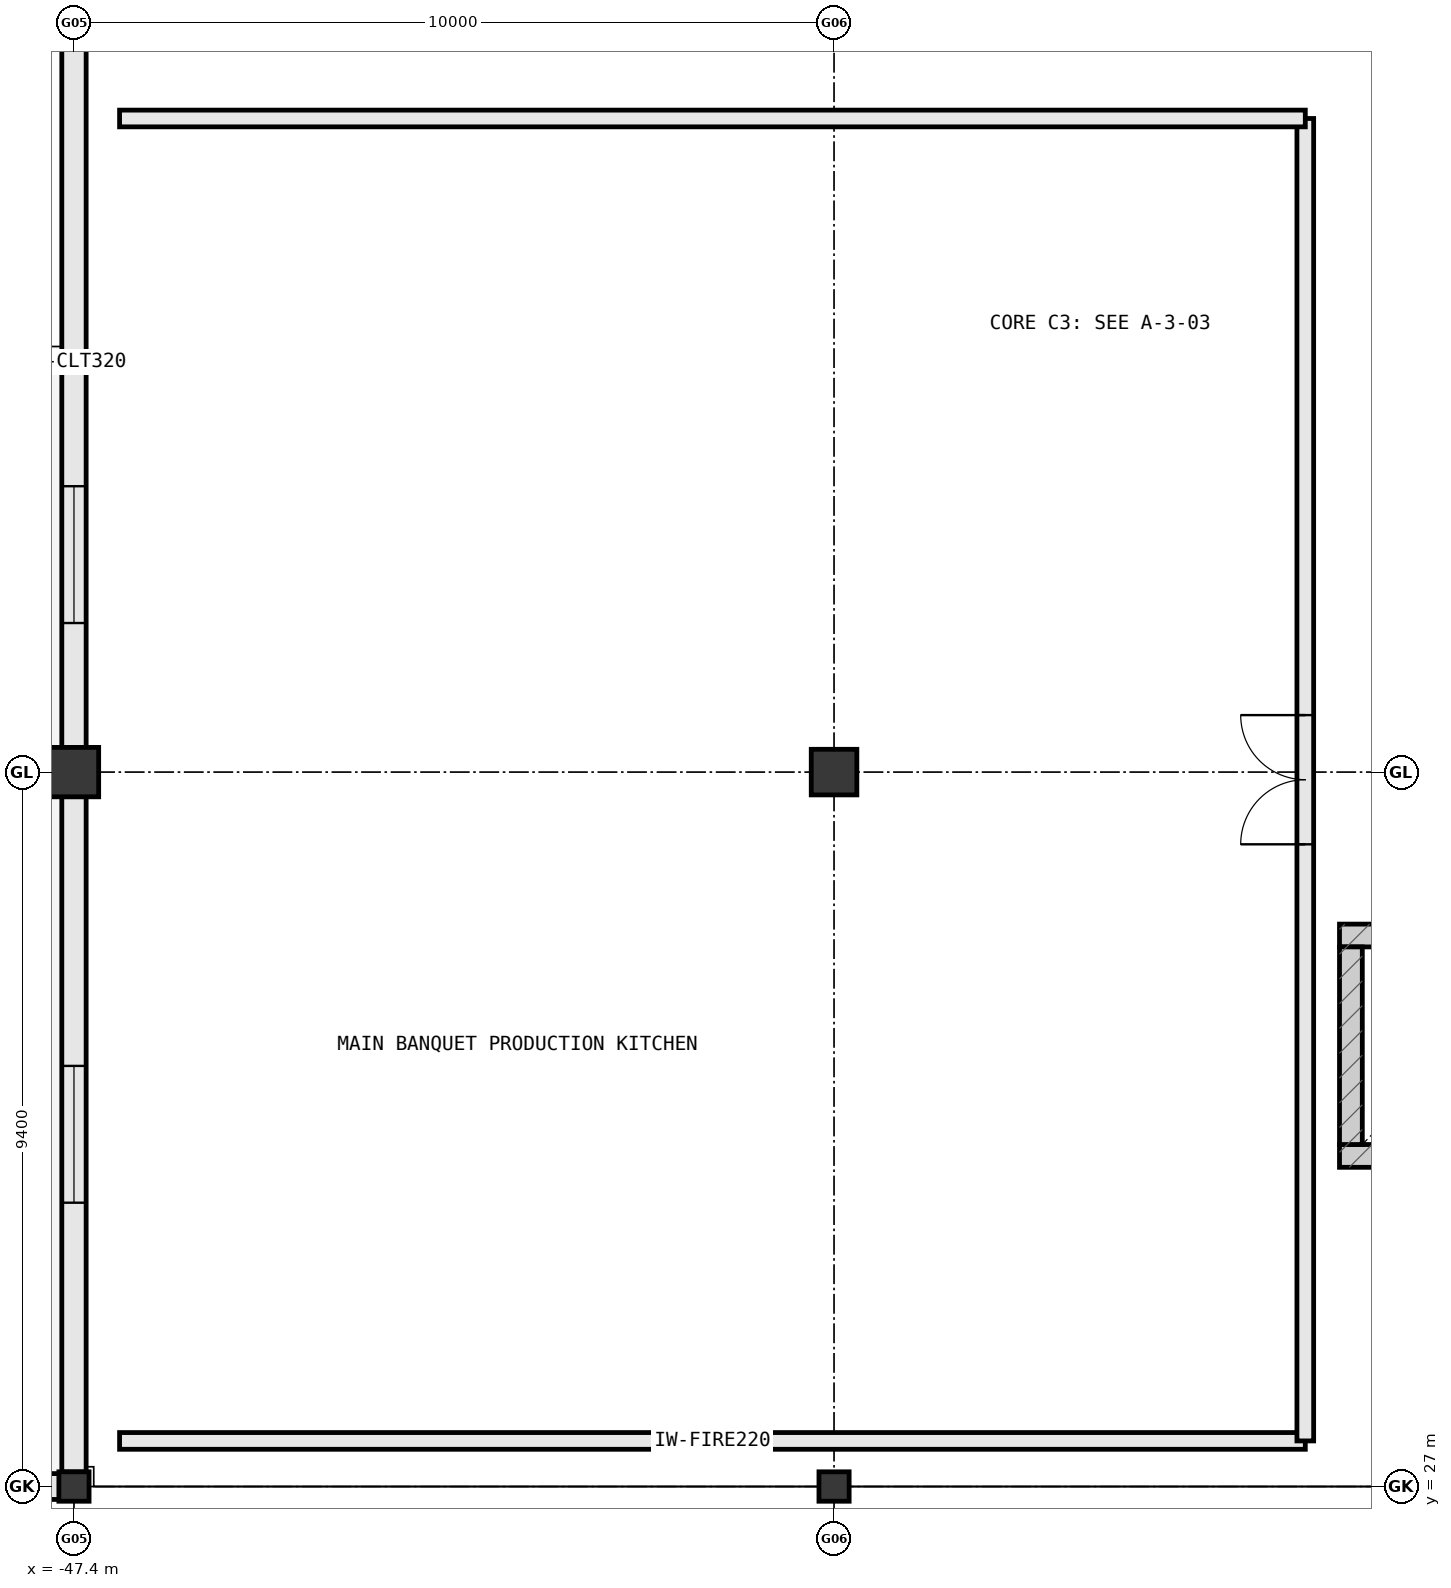
"""IFC4 building model, lengths in metres.
Left out: names, types, materials, properties, quantities, classifications, styles, units other than length and angle.
Written with IfcOpenShell. Run it as: python <this file> out.ifc"""

import sys

from ifc_helpers import new_model, si_unit, direction, frame, frame_2d, origin, origin_2d, place, context, subcontext, project, spatial, rectangle, i_section, extrude, element, fill, save


model = new_model("IFC4")
c1 = context("Model", 3, precision=1e-05, world=origin(), true_north=direction((0.0, 1.0)))
c2 = subcontext(c1, "Body", "Model", "MODEL_VIEW")
j1 = project(units=[si_unit("LENGTHUNIT", "METRE"), si_unit("PLANEANGLEUNIT", "RADIAN")], contexts=[c1])
p1 = place(None, origin())
s1 = spatial("IfcSite", under=j1, at=p1, CompositionType="ELEMENT")
p2 = place(p1, origin())
s2 = spatial("IfcBuilding", under=s1, at=p2, CompositionType="ELEMENT")
p3 = place(p2, origin())
s3 = spatial("IfcBuildingStorey", under=s2, at=p3, CompositionType="ELEMENT", Elevation=0.0)
for number, where, z_axis, x_axis in (
    (1, (-47.4, 27.0, 0.0), (0.0, 0.0, 1.0), (1.0, 0.0, 0.0)),
    (2, (-37.4, 27.0, 0.0), (0.0, 0.0, 1.0), (1.0, 0.0, 0.0)),
):
    element("IfcColumn", number, at=place(p3, frame(where, z_axis=z_axis, x_axis=x_axis)), inside=s3, PredefinedType="COLUMN", context=c2, shape_type="SweptSolid", body=[
        extrude(i_section(OverallWidth=0.397, OverallDepth=0.387, WebThickness=0.021, FlangeThickness=0.033, at=origin_2d()), origin(), (0.0, 0.0, 1.0), 5.4),
    ])
p4 = place(p3, frame((-47.4, 36.4, 0.0), z_axis=(0.0, 0.0, 1.0), x_axis=(1.0, 0.0, 0.0)))
e3 = element("IfcColumn", 3, at=p4, inside=s3, PredefinedType="COLUMN", context=c2, shape_type="SweptSolid", body=[
    extrude(rectangle(XDim=0.65, YDim=0.65, at=origin_2d()), origin(), (0.0, 0.0, 1.0), 5.4),
])
p5 = place(p3, frame((-37.4, 36.4, 0.0), z_axis=(0.0, 0.0, 1.0), x_axis=(1.0, 0.0, 0.0)))
e4 = element("IfcColumn", 4, at=p5, inside=s3, PredefinedType="COLUMN", context=c2, shape_type="SweptSolid", body=[
    extrude(rectangle(XDim=0.6, YDim=0.6, at=origin_2d()), origin(), (0.0, 0.0, 1.0), 5.4),
])
p6 = place(p3, frame((-47.408, 27.0, 0.0), z_axis=(0.0, 0.0, 1.0), x_axis=(-1.0, 0.0, 0.0)))
e5 = element("IfcWall", 5, at=p6, inside=s3, PredefinedType="STANDARD", context=c2, shape_type="SweptSolid", body=[
    extrude(rectangle(XDim=9.983, YDim=0.34, at=frame_2d((4.991, 0.0))), origin(), (0.0, 0.0, 1.0), 4.414),
])
p7 = place(p6, frame((1.071, 0.0, 0.85)))
e6 = element("IfcOpeningElement", 6, at=p7, cuts=e5, PredefinedType="OPENING", context=c2, shape_type="SweptSolid", body=[
    extrude(rectangle(XDim=2.85, YDim=2.18, at=frame_2d((1.425, 1.09))), frame((0.0, 0.182, 0.0), z_axis=(0.0, -1.0, 0.0), x_axis=(1.0, 0.0, 0.0)), (0.0, 0.0, 1.0), 0.364),
])
p8 = place(p6, frame((6.062, 0.0, 0.85)))
e7 = element("IfcOpeningElement", 7, at=p8, cuts=e5, PredefinedType="OPENING", context=c2, shape_type="SweptSolid", body=[
    extrude(rectangle(XDim=2.85, YDim=2.18, at=frame_2d((1.425, 1.09))), frame((0.0, 0.182, 0.0), z_axis=(0.0, -1.0, 0.0), x_axis=(1.0, 0.0, 0.0)), (0.0, 0.0, 1.0), 0.364),
])
p9 = place(p3, frame((-47.4, 46.877, 0.0), z_axis=(0.0, 0.0, 1.0), x_axis=(0.0, -1.0, 0.0)))
e8 = element("IfcWall", 8, at=p9, inside=s3, PredefinedType="STANDARD", context=c2, shape_type="SweptSolid", body=[
    extrude(rectangle(XDim=10.154, YDim=0.32, at=frame_2d((5.077, 0.0))), origin(), (0.0, 0.0, 1.0), 4.422),
])
p10 = place(p9, frame((6.716, 0.0, 0.85)))
e9 = element("IfcOpeningElement", 9, at=p10, cuts=e8, PredefinedType="OPENING", context=c2, shape_type="SweptSolid", body=[
    extrude(rectangle(XDim=1.8, YDim=1.85, at=frame_2d((0.9, 0.925))), frame((0.0, 0.172, 0.0), z_axis=(0.0, -1.0, 0.0), x_axis=(1.0, 0.0, 0.0)), (0.0, 0.0, 1.0), 0.344),
])
p11 = place(p3, frame((-47.4, 36.077, 0.0), z_axis=(0.0, 0.0, 1.0), x_axis=(0.0, -1.0, 0.0)))
e10 = element("IfcWall", 10, at=p11, inside=s3, PredefinedType="STANDARD", context=c2, shape_type="SweptSolid", body=[
    extrude(rectangle(XDim=8.885, YDim=0.32, at=frame_2d((4.443, 0.0))), origin(), (0.0, 0.0, 1.0), 4.498),
])
p12 = place(p11, frame((3.543, 0.0, 0.85)))
e11 = element("IfcOpeningElement", 11, at=p12, cuts=e10, PredefinedType="OPENING", context=c2, shape_type="SweptSolid", body=[
    extrude(rectangle(XDim=1.8, YDim=1.85, at=frame_2d((0.9, 0.925))), frame((0.0, 0.172, 0.0), z_axis=(0.0, -1.0, 0.0), x_axis=(1.0, 0.0, 0.0)), (0.0, 0.0, 1.0), 0.344),
])
p13 = place(p3, frame((-30.75, 31.35, 0.0), z_axis=(0.0, 0.0, 1.0), x_axis=(1.0, 0.0, 0.0)))
e12 = element("IfcWall", 12, at=p13, inside=s3, PredefinedType="SHEAR", context=c2, shape_type="SweptSolid", body=[
    extrude(rectangle(XDim=3.1, YDim=0.3, at=frame_2d((1.55, 0.0))), origin(), (0.0, 0.0, 1.0), 5.4),
])
p14 = place(p13, frame((0.95, 0.0, 0.0)))
e13 = element("IfcOpeningElement", 13, at=p14, cuts=e12, PredefinedType="OPENING", context=c2, shape_type="SweptSolid", body=[
    extrude(rectangle(XDim=1.2, YDim=2.2, at=frame_2d((0.6, 1.1))), frame((0.0, 0.162, 0.0), z_axis=(0.0, -1.0, 0.0), x_axis=(1.0, 0.0, 0.0)), (0.0, 0.0, 1.0), 0.324),
])
p15 = place(p3, frame((-27.65, 34.25, 0.0), z_axis=(0.0, 0.0, 1.0), x_axis=(-1.0, 0.0, 0.0)))
e14 = element("IfcWall", 14, at=p15, inside=s3, PredefinedType="SHEAR", context=c2, shape_type="SweptSolid", body=[
    extrude(rectangle(XDim=3.1, YDim=0.3, at=frame_2d((1.55, 0.0))), origin(), (0.0, 0.0, 1.0), 5.4),
])
p16 = place(p3, frame((-30.6, 34.1, 0.0), z_axis=(0.0, 0.0, 1.0), x_axis=(0.0, -1.0, 0.0)))
e15 = element("IfcWall", 15, at=p16, inside=s3, PredefinedType="SHEAR", context=c2, shape_type="SweptSolid", body=[
    extrude(rectangle(XDim=2.6, YDim=0.3, at=frame_2d((1.3, 0.0))), origin(), (0.0, 0.0, 1.0), 5.4),
])
p17 = place(p3, frame((-46.8, 27.6, 0.0), z_axis=(0.0, 0.0, 1.0), x_axis=(1.0, 0.0, 0.0)))
e16 = element("IfcWall", 16, at=p17, inside=s3, PredefinedType="STANDARD", context=c2, shape_type="SweptSolid", body=[
    extrude(rectangle(XDim=15.6, YDim=0.22, at=frame_2d((7.8, 0.0))), origin(), (0.0, 0.0, 1.0), 5.12),
])
p18 = place(p3, frame((-31.2, 27.6, 0.0), z_axis=(0.0, 0.0, 1.0), x_axis=(0.0, 1.0, 0.0)))
e17 = element("IfcWall", 17, at=p18, inside=s3, PredefinedType="STANDARD", context=c2, shape_type="SweptSolid", body=[
    extrude(rectangle(XDim=17.4, YDim=0.22, at=frame_2d((8.7, 0.0))), origin(), (0.0, 0.0, 1.0), 5.12),
])
p19 = place(p18, frame((7.85, 0.0, 0.0)))
e18 = element("IfcOpeningElement", 18, at=p19, cuts=e17, PredefinedType="OPENING", context=c2, shape_type="SweptSolid", body=[
    extrude(rectangle(XDim=1.7, YDim=2.3, at=frame_2d((0.85, 1.15))), frame((0.0, 0.122, 0.0), z_axis=(0.0, -1.0, 0.0), x_axis=(1.0, 0.0, 0.0)), (0.0, 0.0, 1.0), 0.244),
])
p20 = place(p3, frame((-31.2, 45.0, 0.0), z_axis=(0.0, 0.0, 1.0), x_axis=(-1.0, 0.0, 0.0)))
e19 = element("IfcWall", 19, at=p20, inside=s3, PredefinedType="STANDARD", context=c2, shape_type="SweptSolid", body=[
    extrude(rectangle(XDim=15.6, YDim=0.22, at=frame_2d((7.8, 0.0))), origin(), (0.0, 0.0, 1.0), 5.12),
])
p21 = place(p10, origin())
e20 = element("IfcWindow", 20, at=p21, inside=s3, PartitioningType="SINGLE_PANEL", PredefinedType="WINDOW", context=c2, shape_type="SweptSolid", body=[
    extrude(rectangle(XDim=1.8, YDim=1.85, at=frame_2d((0.9, 0.925))), frame((0.0, 0.03, 0.0), z_axis=(0.0, -1.0, 0.0), x_axis=(1.0, 0.0, 0.0)), (0.0, 0.0, 1.0), 0.06),
])
fill(e9, e20)
p22 = place(p12, origin())
e21 = element("IfcWindow", 21, at=p22, inside=s3, PartitioningType="SINGLE_PANEL", PredefinedType="WINDOW", context=c2, shape_type="SweptSolid", body=[
    extrude(rectangle(XDim=1.8, YDim=1.85, at=frame_2d((0.9, 0.925))), frame((0.0, 0.03, 0.0), z_axis=(0.0, -1.0, 0.0), x_axis=(1.0, 0.0, 0.0)), (0.0, 0.0, 1.0), 0.06),
])
fill(e11, e21)
p23 = place(p19, origin())
e22 = element("IfcDoor", 22, at=p23, inside=s3, OperationType="DOUBLE_DOOR_SINGLE_SWING", PredefinedType="DOOR", context=c2, shape_type="SweptSolid", body=[
    extrude(rectangle(XDim=1.7, YDim=2.3, at=frame_2d((0.85, 1.15))), frame((0.0, 0.025, 0.0), z_axis=(0.0, -1.0, 0.0), x_axis=(1.0, 0.0, 0.0)), (0.0, 0.0, 1.0), 0.05),
])
fill(e18, e22)
save(model, sys.argv[1])
